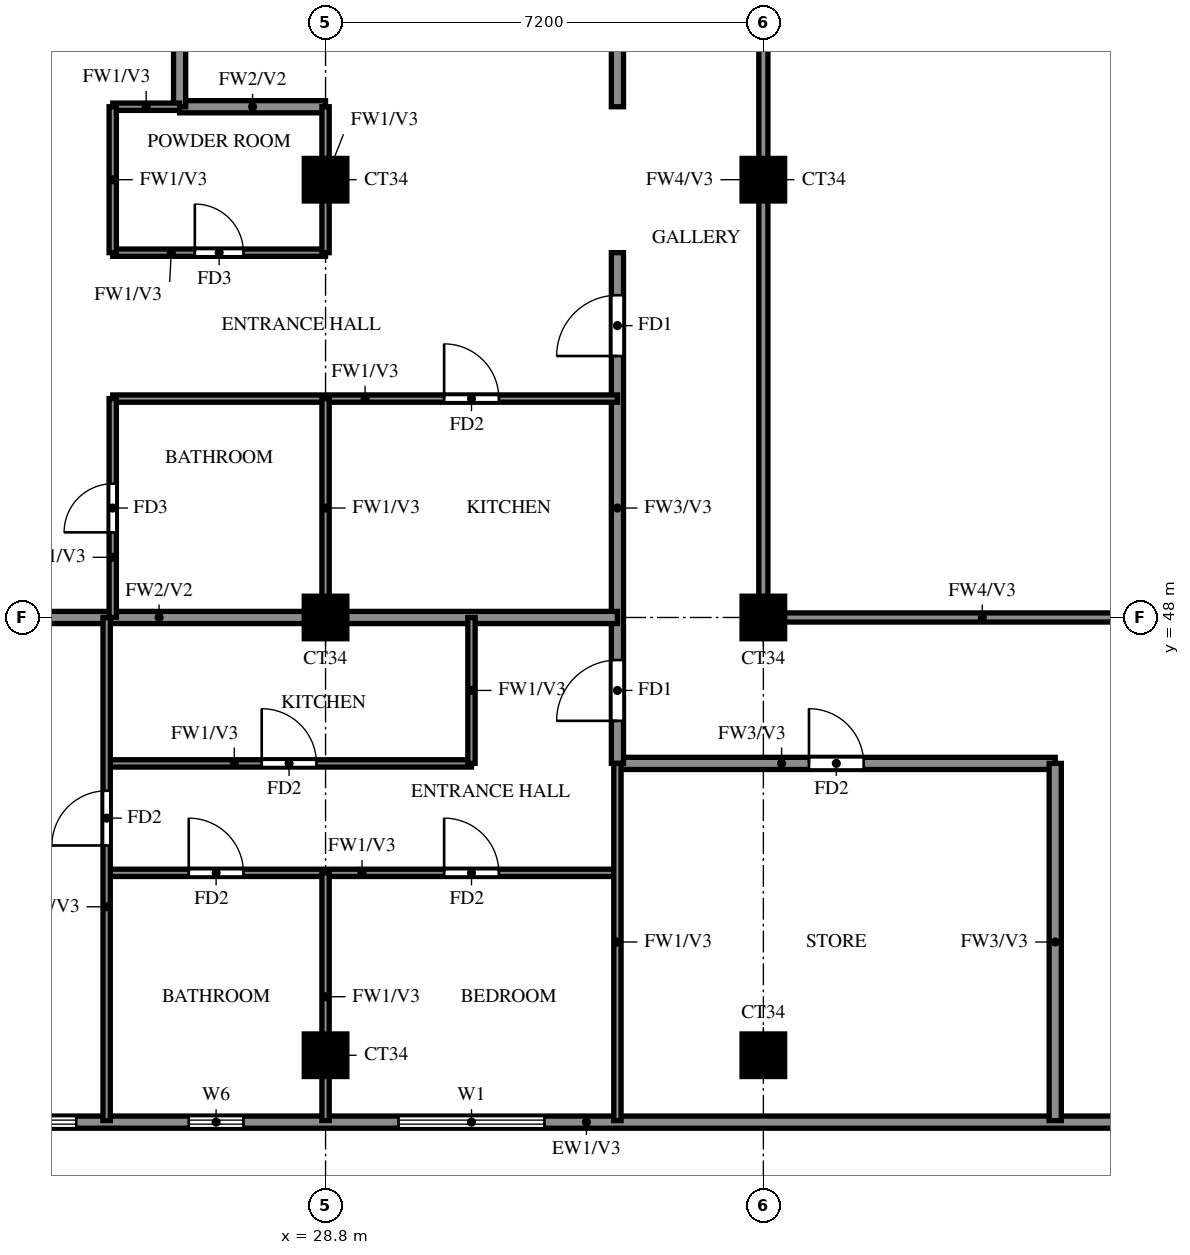
"""IFC4 building model, lengths in metres.
Left out: names, types, materials, properties, quantities, classifications, styles, units other than length and angle.
Written with IfcOpenShell. Run it as: python <this file> out.ifc"""

import sys

from ifc_helpers import new_model, si_unit, direction, frame, frame_2d, origin, origin_2d, place, context, subcontext, project, spatial, rectangle, extrude, source, transform, mapped, element, fill, save


model = new_model("IFC4")
c1 = context("Model", 3, precision=1e-05, world=origin(), true_north=direction((0.0, 1.0)))
c2 = subcontext(c1, "Body", "Model", "MODEL_VIEW")
j1 = project(units=[si_unit("LENGTHUNIT", "METRE"), si_unit("PLANEANGLEUNIT", "RADIAN")], contexts=[c1])
p1 = place(None, origin())
s1 = spatial("IfcSite", under=j1, at=p1, CompositionType="ELEMENT")
p2 = place(p1, origin())
s2 = spatial("IfcBuilding", under=s1, at=p2, CompositionType="ELEMENT")
p3 = place(p2, frame((0.0, 0.0, 253.5)))
s3 = spatial("IfcBuildingStorey", under=s2, at=p3, CompositionType="ELEMENT", Elevation=253.5)
m1 = source(origin(), c2, "Body", "SweptSolid", [
    extrude(rectangle(XDim=0.7, YDim=0.7, at=origin_2d()), origin(), (0.0, 0.0, 1.0), 3.22),
])
for number, where, z_axis, x_axis in (
    (1, (28.8, 40.8, 0.0), (0.0, 0.0, 1.0), (1.0, 0.0, 0.0)),
    (2, (36.0, 40.8, 0.0), (0.0, 0.0, 1.0), (1.0, 0.0, 0.0)),
    (3, (28.8, 48.0, 0.0), (0.0, 0.0, 1.0), (1.0, 0.0, 0.0)),
    (4, (36.0, 48.0, 0.0), (0.0, 0.0, 1.0), (1.0, 0.0, 0.0)),
    (5, (28.8, 55.2, 0.0), (0.0, 0.0, 1.0), (1.0, 0.0, 0.0)),
    (6, (36.0, 55.2, 0.0), (0.0, 0.0, 1.0), (1.0, 0.0, 0.0)),
):
    element("IfcColumn", number, at=place(p3, frame(where, z_axis=z_axis, x_axis=x_axis)), inside=s3, PredefinedType="COLUMN", context=c2, shape_type="MappedRepresentation", body=[
        mapped(m1, transform((0.0, 0.0, 0.0))),
    ])
p4 = place(p3, frame((22.2, 39.7, 0.0), z_axis=(0.0, 0.0, 1.0), x_axis=(1.0, 0.0, 0.0)))
e7 = element("IfcWall", 7, at=p4, inside=s3, PredefinedType="SOLIDWALL", context=c2, shape_type="SweptSolid", body=[
    extrude(rectangle(XDim=19.8, YDim=0.2, at=frame_2d((9.9, 0.0))), origin(), (0.0, 0.0, 1.0), 3.22),
])
p5 = place(p4, frame((0.7, 0.0, 0.6)))
e8 = element("IfcOpeningElement", 8, at=p5, cuts=e7, PredefinedType="OPENING", context=c2, shape_type="SweptSolid", body=[
    extrude(rectangle(XDim=1.8, YDim=2.4, at=frame_2d((0.9, 1.2))), frame((0.0, 0.11, 0.0), z_axis=(0.0, -1.0, 0.0), x_axis=(1.0, 0.0, 0.0)), (0.0, 0.0, 1.0), 0.22),
])
p6 = place(p4, frame((4.35, 0.0, 1.5)))
e9 = element("IfcOpeningElement", 9, at=p6, cuts=e7, PredefinedType="OPENING", context=c2, shape_type="SweptSolid", body=[
    extrude(rectangle(XDim=0.9, YDim=0.9, at=frame_2d((0.45, 0.45))), frame((0.0, 0.11, 0.0), z_axis=(0.0, -1.0, 0.0), x_axis=(1.0, 0.0, 0.0)), (0.0, 0.0, 1.0), 0.22),
])
p7 = place(p4, frame((7.8, 0.0, 0.6)))
e10 = element("IfcOpeningElement", 10, at=p7, cuts=e7, PredefinedType="OPENING", context=c2, shape_type="SweptSolid", body=[
    extrude(rectangle(XDim=2.4, YDim=2.4, at=frame_2d((1.2, 1.2))), frame((0.0, 0.11, 0.0), z_axis=(0.0, -1.0, 0.0), x_axis=(1.0, 0.0, 0.0)), (0.0, 0.0, 1.0), 0.22),
])
p8 = place(p3, frame((33.6, 45.6, 0.0), z_axis=(0.0, 0.0, 1.0), x_axis=(1.0, 0.0, 0.0)))
e11 = element("IfcWall", 11, at=p8, inside=s3, PredefinedType="SOLIDWALL", context=c2, shape_type="SweptSolid", body=[
    extrude(rectangle(XDim=7.2, YDim=0.2, at=frame_2d((3.6, 0.0))), origin(), (0.0, 0.0, 1.0), 3.22),
])
p9 = place(p8, frame((3.15, 0.0, 0.0)))
e12 = element("IfcOpeningElement", 12, at=p9, cuts=e11, PredefinedType="OPENING", context=c2, shape_type="SweptSolid", body=[
    extrude(rectangle(XDim=0.9, YDim=2.1, at=frame_2d((0.45, 1.05))), frame((0.0, 0.11, 0.0), z_axis=(0.0, -1.0, 0.0), x_axis=(1.0, 0.0, 0.0)), (0.0, 0.0, 1.0), 0.22),
])
p10 = place(p3, frame((33.6, 45.6, 0.0), z_axis=(0.0, 0.0, 1.0), x_axis=(0.0, 1.0, 0.0)))
e13 = element("IfcWall", 13, at=p10, inside=s3, PredefinedType="SOLIDWALL", context=c2, shape_type="SweptSolid", body=[
    extrude(rectangle(XDim=8.4, YDim=0.2, at=frame_2d((4.2, 0.0))), origin(), (0.0, 0.0, 1.0), 3.22),
])
p11 = place(p10, frame((0.7, 0.0, 0.0)))
e14 = element("IfcOpeningElement", 14, at=p11, cuts=e13, PredefinedType="OPENING", context=c2, shape_type="SweptSolid", body=[
    extrude(rectangle(XDim=1.0, YDim=2.1, at=frame_2d((0.5, 1.05))), frame((0.0, 0.11, 0.0), z_axis=(0.0, -1.0, 0.0), x_axis=(1.0, 0.0, 0.0)), (0.0, 0.0, 1.0), 0.22),
])
p12 = place(p10, frame((6.7, 0.0, 0.0)))
e15 = element("IfcOpeningElement", 15, at=p12, cuts=e13, PredefinedType="OPENING", context=c2, shape_type="SweptSolid", body=[
    extrude(rectangle(XDim=1.0, YDim=2.1, at=frame_2d((0.5, 1.05))), frame((0.0, 0.11, 0.0), z_axis=(0.0, -1.0, 0.0), x_axis=(1.0, 0.0, 0.0)), (0.0, 0.0, 1.0), 0.22),
])
p13 = place(p3, frame((33.6, 56.4, 0.0), z_axis=(0.0, 0.0, 1.0), x_axis=(0.0, 1.0, 0.0)))
e16 = element("IfcWall", 16, at=p13, inside=s3, PredefinedType="SOLIDWALL", context=c2, shape_type="SweptSolid", body=[
    extrude(rectangle(XDim=6.0, YDim=0.2, at=frame_2d((3.0, 0.0))), origin(), (0.0, 0.0, 1.0), 3.22),
])
p14 = place(p13, frame((3.7, 0.0, 0.0)))
e17 = element("IfcOpeningElement", 17, at=p14, cuts=e16, PredefinedType="OPENING", context=c2, shape_type="SweptSolid", body=[
    extrude(rectangle(XDim=1.0, YDim=2.1, at=frame_2d((0.5, 1.05))), frame((0.0, 0.11, 0.0), z_axis=(0.0, -1.0, 0.0), x_axis=(1.0, 0.0, 0.0)), (0.0, 0.0, 1.0), 0.22),
])
p15 = place(p3, frame((40.8, 39.725, 0.0), z_axis=(0.0, 0.0, 1.0), x_axis=(0.0, 1.0, 0.0)))
e18 = element("IfcWall", 18, at=p15, inside=s3, PredefinedType="SOLIDWALL", context=c2, shape_type="SweptSolid", body=[
    extrude(rectangle(XDim=5.875, YDim=0.2, at=frame_2d((2.938, 0.0))), origin(), (0.0, 0.0, 1.0), 3.22),
])
p16 = place(p3, frame((18.525, 48.0, 0.0), z_axis=(0.0, 0.0, 1.0), x_axis=(1.0, 0.0, 0.0)))
e19 = element("IfcWall", 19, at=p16, inside=s3, PredefinedType="SOLIDWALL", context=c2, shape_type="SweptSolid", body=[
    extrude(rectangle(XDim=15.075, YDim=0.2, at=frame_2d((7.538, 0.0))), origin(), (0.0, 0.0, 1.0), 3.22),
])
for number, where, z_axis, x_axis in (
    (20, (26.4, 56.4, 0.0), (0.0, 0.0, 1.0), (1.0, 0.0, 0.0)),
    (21, (26.4, 56.4, 0.0), (0.0, 0.0, 1.0), (0.0, 1.0, 0.0)),
):
    element("IfcWall", number, at=place(p3, frame(where, z_axis=z_axis, x_axis=x_axis)), inside=s3, PredefinedType="SOLIDWALL", context=c2, shape_type="SweptSolid", body=[
        extrude(rectangle(XDim=2.4, YDim=0.2, at=frame_2d((1.2, 0.0))), origin(), (0.0, 0.0, 1.0), 3.22),
    ])
p17 = place(p3, frame((25.2, 43.8, 0.0), z_axis=(0.0, 0.0, 1.0), x_axis=(1.0, 0.0, 0.0)))
e22 = element("IfcWall", 22, at=p17, inside=s3, PredefinedType="PARTITIONING", context=c2, shape_type="SweptSolid", body=[
    extrude(rectangle(XDim=8.4, YDim=0.12, at=frame_2d((4.2, 0.0))), origin(), (0.0, 0.0, 1.0), 3.22),
])
p18 = place(p17, frame((1.35, 0.0, 0.0)))
e23 = element("IfcOpeningElement", 23, at=p18, cuts=e22, PredefinedType="OPENING", context=c2, shape_type="SweptSolid", body=[
    extrude(rectangle(XDim=0.9, YDim=2.1, at=frame_2d((0.45, 1.05))), frame((0.0, 0.07, 0.0), z_axis=(0.0, -1.0, 0.0), x_axis=(1.0, 0.0, 0.0)), (0.0, 0.0, 1.0), 0.14),
])
p19 = place(p17, frame((5.55, 0.0, 0.0)))
e24 = element("IfcOpeningElement", 24, at=p19, cuts=e22, PredefinedType="OPENING", context=c2, shape_type="SweptSolid", body=[
    extrude(rectangle(XDim=0.9, YDim=2.1, at=frame_2d((0.45, 1.05))), frame((0.0, 0.07, 0.0), z_axis=(0.0, -1.0, 0.0), x_axis=(1.0, 0.0, 0.0)), (0.0, 0.0, 1.0), 0.14),
])
p20 = place(p3, frame((25.2, 45.6, 0.0), z_axis=(0.0, 0.0, 1.0), x_axis=(1.0, 0.0, 0.0)))
e25 = element("IfcWall", 25, at=p20, inside=s3, PredefinedType="PARTITIONING", context=c2, shape_type="SweptSolid", body=[
    extrude(rectangle(XDim=6.0, YDim=0.12, at=frame_2d((3.0, 0.0))), origin(), (0.0, 0.0, 1.0), 3.22),
])
p21 = place(p20, frame((2.55, 0.0, 0.0)))
e26 = element("IfcOpeningElement", 26, at=p21, cuts=e25, PredefinedType="OPENING", context=c2, shape_type="SweptSolid", body=[
    extrude(rectangle(XDim=0.9, YDim=2.1, at=frame_2d((0.45, 1.05))), frame((0.0, 0.07, 0.0), z_axis=(0.0, -1.0, 0.0), x_axis=(1.0, 0.0, 0.0)), (0.0, 0.0, 1.0), 0.14),
])
p22 = place(p3, frame((25.3, 51.6, 0.0), z_axis=(0.0, 0.0, 1.0), x_axis=(1.0, 0.0, 0.0)))
e27 = element("IfcWall", 27, at=p22, inside=s3, PredefinedType="PARTITIONING", context=c2, shape_type="SweptSolid", body=[
    extrude(rectangle(XDim=8.3, YDim=0.12, at=frame_2d((4.15, 0.0))), origin(), (0.0, 0.0, 1.0), 3.22),
])
p23 = place(p22, frame((5.45, 0.0, 0.0)))
e28 = element("IfcOpeningElement", 28, at=p23, cuts=e27, PredefinedType="OPENING", context=c2, shape_type="SweptSolid", body=[
    extrude(rectangle(XDim=0.9, YDim=2.1, at=frame_2d((0.45, 1.05))), frame((0.0, 0.07, 0.0), z_axis=(0.0, -1.0, 0.0), x_axis=(1.0, 0.0, 0.0)), (0.0, 0.0, 1.0), 0.14),
])
p24 = place(p3, frame((25.3, 54.0, 0.0), z_axis=(0.0, 0.0, 1.0), x_axis=(1.0, 0.0, 0.0)))
e29 = element("IfcWall", 29, at=p24, inside=s3, PredefinedType="PARTITIONING", context=c2, shape_type="SweptSolid", body=[
    extrude(rectangle(XDim=3.5, YDim=0.12, at=frame_2d((1.75, 0.0))), origin(), (0.0, 0.0, 1.0), 3.22),
])
p25 = place(p24, frame((1.35, 0.0, 0.0)))
e30 = element("IfcOpeningElement", 30, at=p25, cuts=e29, PredefinedType="OPENING", context=c2, shape_type="SweptSolid", body=[
    extrude(rectangle(XDim=0.8, YDim=2.1, at=frame_2d((0.4, 1.05))), frame((0.0, 0.07, 0.0), z_axis=(0.0, -1.0, 0.0), x_axis=(1.0, 0.0, 0.0)), (0.0, 0.0, 1.0), 0.14),
])
p26 = place(p3, frame((25.3, 56.4, 0.0), z_axis=(0.0, 0.0, 1.0), x_axis=(1.0, 0.0, 0.0)))
e31 = element("IfcWall", 31, at=p26, inside=s3, PredefinedType="PARTITIONING", context=c2, shape_type="SweptSolid", body=[
    extrude(rectangle(XDim=1.1, YDim=0.12, at=frame_2d((0.55, 0.0))), origin(), (0.0, 0.0, 1.0), 3.22),
])
p27 = place(p3, frame((25.2, 39.725, 0.0), z_axis=(0.0, 0.0, 1.0), x_axis=(0.0, 1.0, 0.0)))
e32 = element("IfcWall", 32, at=p27, inside=s3, PredefinedType="PARTITIONING", context=c2, shape_type="SweptSolid", body=[
    extrude(rectangle(XDim=8.275, YDim=0.12, at=frame_2d((4.137, 0.0))), origin(), (0.0, 0.0, 1.0), 3.22),
])
p28 = place(p27, frame((4.525, 0.0, 0.0)))
e33 = element("IfcOpeningElement", 33, at=p28, cuts=e32, PredefinedType="OPENING", context=c2, shape_type="SweptSolid", body=[
    extrude(rectangle(XDim=0.9, YDim=2.1, at=frame_2d((0.45, 1.05))), frame((0.0, 0.07, 0.0), z_axis=(0.0, -1.0, 0.0), x_axis=(1.0, 0.0, 0.0)), (0.0, 0.0, 1.0), 0.14),
])
p29 = place(p3, frame((25.3, 48.0, 0.0), z_axis=(0.0, 0.0, 1.0), x_axis=(0.0, 1.0, 0.0)))
e34 = element("IfcWall", 34, at=p29, inside=s3, PredefinedType="PARTITIONING", context=c2, shape_type="SweptSolid", body=[
    extrude(rectangle(XDim=3.6, YDim=0.12, at=frame_2d((1.8, 0.0))), origin(), (0.0, 0.0, 1.0), 3.22),
])
p30 = place(p29, frame((1.4, 0.0, 0.0)))
e35 = element("IfcOpeningElement", 35, at=p30, cuts=e34, PredefinedType="OPENING", context=c2, shape_type="SweptSolid", body=[
    extrude(rectangle(XDim=0.8, YDim=2.1, at=frame_2d((0.4, 1.05))), frame((0.0, 0.07, 0.0), z_axis=(0.0, -1.0, 0.0), x_axis=(1.0, 0.0, 0.0)), (0.0, 0.0, 1.0), 0.14),
])
p31 = place(p3, frame((25.3, 54.0, 0.0), z_axis=(0.0, 0.0, 1.0), x_axis=(0.0, 1.0, 0.0)))
e36 = element("IfcWall", 36, at=p31, inside=s3, PredefinedType="PARTITIONING", context=c2, shape_type="SweptSolid", body=[
    extrude(rectangle(XDim=2.4, YDim=0.12, at=frame_2d((1.2, 0.0))), origin(), (0.0, 0.0, 1.0), 3.22),
])
p32 = place(p3, frame((28.8, 39.725, 0.0), z_axis=(0.0, 0.0, 1.0), x_axis=(0.0, 1.0, 0.0)))
e37 = element("IfcWall", 37, at=p32, inside=s3, PredefinedType="PARTITIONING", context=c2, shape_type="SweptSolid", body=[
    extrude(rectangle(XDim=4.075, YDim=0.12, at=frame_2d((2.038, 0.0))), origin(), (0.0, 0.0, 1.0), 3.22),
])
p33 = place(p3, frame((28.8, 48.0, 0.0), z_axis=(0.0, 0.0, 1.0), x_axis=(0.0, 1.0, 0.0)))
e38 = element("IfcWall", 38, at=p33, inside=s3, PredefinedType="PARTITIONING", context=c2, shape_type="SweptSolid", body=[
    extrude(rectangle(XDim=3.6, YDim=0.12, at=frame_2d((1.8, 0.0))), origin(), (0.0, 0.0, 1.0), 3.22),
])
for number, where, z_axis, x_axis in (
    (39, (28.8, 54.0, 0.0), (0.0, 0.0, 1.0), (0.0, 1.0, 0.0)),
    (40, (31.2, 45.6, 0.0), (0.0, 0.0, 1.0), (0.0, 1.0, 0.0)),
):
    element("IfcWall", number, at=place(p3, frame(where, z_axis=z_axis, x_axis=x_axis)), inside=s3, PredefinedType="PARTITIONING", context=c2, shape_type="SweptSolid", body=[
        extrude(rectangle(XDim=2.4, YDim=0.12, at=frame_2d((1.2, 0.0))), origin(), (0.0, 0.0, 1.0), 3.22),
    ])
p34 = place(p3, frame((33.6, 39.725, 0.0), z_axis=(0.0, 0.0, 1.0), x_axis=(0.0, 1.0, 0.0)))
e41 = element("IfcWall", 41, at=p34, inside=s3, PredefinedType="PARTITIONING", context=c2, shape_type="SweptSolid", body=[
    extrude(rectangle(XDim=5.875, YDim=0.12, at=frame_2d((2.938, 0.0))), origin(), (0.0, 0.0, 1.0), 3.22),
])
p35 = place(p3, frame((36.0, 48.0, 0.0), z_axis=(0.0, 0.0, 1.0), x_axis=(1.0, 0.0, 0.0)))
e42 = element("IfcWall", 42, at=p35, inside=s3, PredefinedType="SOLIDWALL", context=c2, shape_type="SweptSolid", body=[
    extrude(rectangle(XDim=7.2, YDim=0.15, at=frame_2d((3.6, 0.0))), origin(), (0.0, 0.0, 1.0), 2.32),
])
p36 = place(p3, frame((36.0, 48.0, 0.0), z_axis=(0.0, 0.0, 1.0), x_axis=(0.0, 1.0, 0.0)))
e43 = element("IfcWall", 43, at=p36, inside=s3, PredefinedType="SOLIDWALL", context=c2, shape_type="SweptSolid", body=[
    extrude(rectangle(XDim=14.4, YDim=0.15, at=frame_2d((7.2, 0.0))), origin(), (0.0, 0.0, 1.0), 2.32),
])
p37 = place(p5, origin())
e44 = element("IfcWindow", 44, at=p37, inside=s3, PartitioningType="DOUBLE_PANEL_VERTICAL", PredefinedType="WINDOW", context=c2, shape_type="SweptSolid", body=[
    extrude(rectangle(XDim=1.8, YDim=2.4, at=frame_2d((0.9, 1.2))), frame((0.0, 0.03, 0.0), z_axis=(0.0, -1.0, 0.0), x_axis=(1.0, 0.0, 0.0)), (0.0, 0.0, 1.0), 0.06),
])
fill(e8, e44)
p38 = place(p6, origin())
e45 = element("IfcWindow", 45, at=p38, inside=s3, PartitioningType="SINGLE_PANEL", PredefinedType="WINDOW", context=c2, shape_type="SweptSolid", body=[
    extrude(rectangle(XDim=0.9, YDim=0.9, at=frame_2d((0.45, 0.45))), frame((0.0, 0.03, 0.0), z_axis=(0.0, -1.0, 0.0), x_axis=(1.0, 0.0, 0.0)), (0.0, 0.0, 1.0), 0.06),
])
fill(e9, e45)
p39 = place(p7, origin())
e46 = element("IfcWindow", 46, at=p39, inside=s3, PartitioningType="DOUBLE_PANEL_VERTICAL", PredefinedType="WINDOW", context=c2, shape_type="SweptSolid", body=[
    extrude(rectangle(XDim=2.4, YDim=2.4, at=frame_2d((1.2, 1.2))), frame((0.0, 0.03, 0.0), z_axis=(0.0, -1.0, 0.0), x_axis=(1.0, 0.0, 0.0)), (0.0, 0.0, 1.0), 0.06),
])
fill(e10, e46)
p40 = place(p11, origin())
e47 = element("IfcDoor", 47, at=p40, inside=s3, OperationType="SINGLE_SWING_LEFT", PredefinedType="DOOR", context=c2, shape_type="SweptSolid", body=[
    extrude(rectangle(XDim=1.0, YDim=2.1, at=frame_2d((0.5, 1.05))), frame((0.0, 0.025, 0.0), z_axis=(0.0, -1.0, 0.0), x_axis=(1.0, 0.0, 0.0)), (0.0, 0.0, 1.0), 0.05),
])
fill(e14, e47)
p41 = place(p28, origin())
e48 = element("IfcDoor", 48, at=p41, inside=s3, OperationType="SINGLE_SWING_RIGHT", PredefinedType="DOOR", context=c2, shape_type="SweptSolid", body=[
    extrude(rectangle(XDim=0.9, YDim=2.1, at=frame_2d((0.45, 1.05))), frame((0.0, 0.025, 0.0), z_axis=(0.0, -1.0, 0.0), x_axis=(1.0, 0.0, 0.0)), (0.0, 0.0, 1.0), 0.05),
])
fill(e33, e48)
p42 = place(p18, origin())
e49 = element("IfcDoor", 49, at=p42, inside=s3, OperationType="SINGLE_SWING_LEFT", PredefinedType="DOOR", context=c2, shape_type="SweptSolid", body=[
    extrude(rectangle(XDim=0.9, YDim=2.1, at=frame_2d((0.45, 1.05))), frame((0.0, 0.025, 0.0), z_axis=(0.0, -1.0, 0.0), x_axis=(1.0, 0.0, 0.0)), (0.0, 0.0, 1.0), 0.05),
])
fill(e23, e49)
p43 = place(p19, origin())
e50 = element("IfcDoor", 50, at=p43, inside=s3, OperationType="SINGLE_SWING_LEFT", PredefinedType="DOOR", context=c2, shape_type="SweptSolid", body=[
    extrude(rectangle(XDim=0.9, YDim=2.1, at=frame_2d((0.45, 1.05))), frame((0.0, 0.025, 0.0), z_axis=(0.0, -1.0, 0.0), x_axis=(1.0, 0.0, 0.0)), (0.0, 0.0, 1.0), 0.05),
])
fill(e24, e50)
p44 = place(p21, origin())
e51 = element("IfcDoor", 51, at=p44, inside=s3, OperationType="SINGLE_SWING_RIGHT", PredefinedType="DOOR", context=c2, shape_type="SweptSolid", body=[
    extrude(rectangle(XDim=0.9, YDim=2.1, at=frame_2d((0.45, 1.05))), frame((0.0, 0.025, 0.0), z_axis=(0.0, -1.0, 0.0), x_axis=(1.0, 0.0, 0.0)), (0.0, 0.0, 1.0), 0.05),
])
fill(e26, e51)
p45 = place(p9, origin())
e52 = element("IfcDoor", 52, at=p45, inside=s3, OperationType="SINGLE_SWING_LEFT", PredefinedType="DOOR", context=c2, shape_type="SweptSolid", body=[
    extrude(rectangle(XDim=0.9, YDim=2.1, at=frame_2d((0.45, 1.05))), frame((0.0, 0.025, 0.0), z_axis=(0.0, -1.0, 0.0), x_axis=(1.0, 0.0, 0.0)), (0.0, 0.0, 1.0), 0.05),
])
fill(e12, e52)
p46 = place(p12, origin())
e53 = element("IfcDoor", 53, at=p46, inside=s3, OperationType="SINGLE_SWING_LEFT", PredefinedType="DOOR", context=c2, shape_type="SweptSolid", body=[
    extrude(rectangle(XDim=1.0, YDim=2.1, at=frame_2d((0.5, 1.05))), frame((0.0, 0.025, 0.0), z_axis=(0.0, -1.0, 0.0), x_axis=(1.0, 0.0, 0.0)), (0.0, 0.0, 1.0), 0.05),
])
fill(e15, e53)
p47 = place(p30, origin())
e54 = element("IfcDoor", 54, at=p47, inside=s3, OperationType="SINGLE_SWING_LEFT", PredefinedType="DOOR", context=c2, shape_type="SweptSolid", body=[
    extrude(rectangle(XDim=0.8, YDim=2.1, at=frame_2d((0.4, 1.05))), frame((0.0, 0.025, 0.0), z_axis=(0.0, -1.0, 0.0), x_axis=(1.0, 0.0, 0.0)), (0.0, 0.0, 1.0), 0.05),
])
fill(e35, e54)
p48 = place(p25, origin())
e55 = element("IfcDoor", 55, at=p48, inside=s3, OperationType="SINGLE_SWING_RIGHT", PredefinedType="DOOR", context=c2, shape_type="SweptSolid", body=[
    extrude(rectangle(XDim=0.8, YDim=2.1, at=frame_2d((0.4, 1.05))), frame((0.0, 0.025, 0.0), z_axis=(0.0, -1.0, 0.0), x_axis=(1.0, 0.0, 0.0)), (0.0, 0.0, 1.0), 0.05),
])
fill(e30, e55)
p49 = place(p23, origin())
e56 = element("IfcDoor", 56, at=p49, inside=s3, OperationType="SINGLE_SWING_LEFT", PredefinedType="DOOR", context=c2, shape_type="SweptSolid", body=[
    extrude(rectangle(XDim=0.9, YDim=2.1, at=frame_2d((0.45, 1.05))), frame((0.0, 0.025, 0.0), z_axis=(0.0, -1.0, 0.0), x_axis=(1.0, 0.0, 0.0)), (0.0, 0.0, 1.0), 0.05),
])
fill(e28, e56)
save(model, sys.argv[1])
